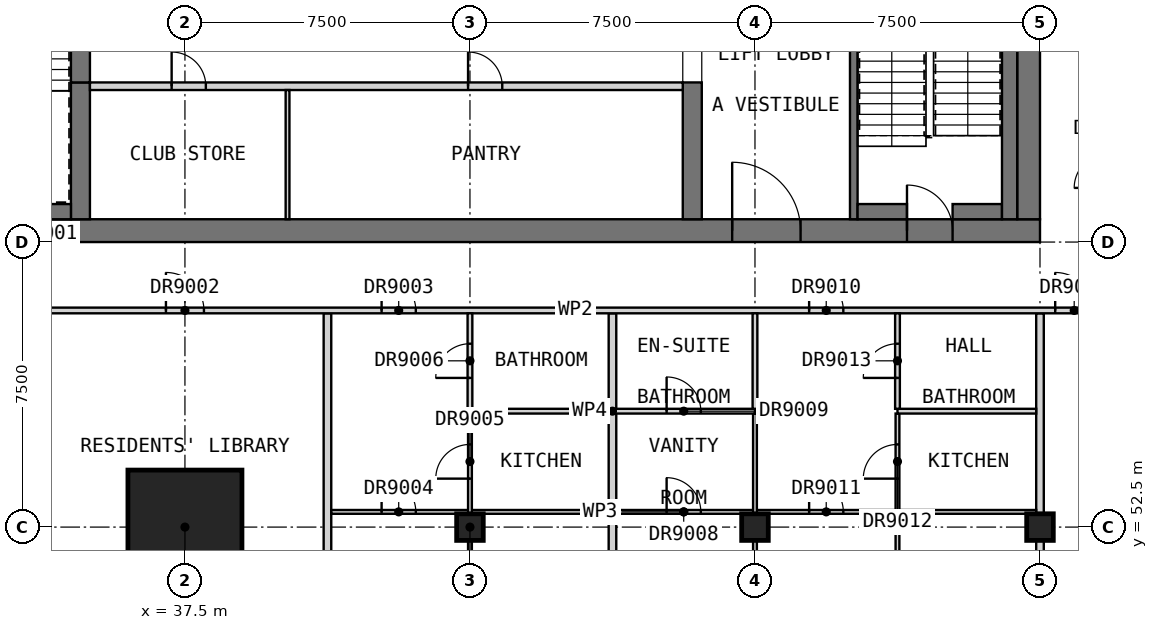
"""IFC4 building model, lengths in metres.
Left out: names, types, materials, properties, quantities, classifications, styles, units other than length and angle.
Written with IfcOpenShell. Run it as: python <this file> out.ifc"""

import sys

from ifc_helpers import new_model, si_unit, direction, frame, frame_2d, origin, origin_2d, place, context, subcontext, project, spatial, rectangle, extrude, element, fill, save


model = new_model("IFC4")
c1 = context("Model", 3, precision=1e-05, world=origin(), true_north=direction((0.0, 1.0)))
c2 = subcontext(c1, "Body", "Model", "MODEL_VIEW")
j1 = project(units=[si_unit("LENGTHUNIT", "METRE"), si_unit("PLANEANGLEUNIT", "RADIAN")], contexts=[c1])
p1 = place(None, origin())
s1 = spatial("IfcSite", under=j1, at=p1, CompositionType="ELEMENT")
p2 = place(p1, origin())
s2 = spatial("IfcBuilding", under=s1, at=p2, CompositionType="ELEMENT")
p3 = place(p2, frame((0.0, 0.0, 280.2)))
s3 = spatial("IfcBuildingStorey", under=s2, at=p3, CompositionType="ELEMENT", Elevation=280.2)
for number, where, z_axis, x_axis in (
    (1, (45.0, 52.5, 0.0), (0.0, 0.0, 1.0), (1.0, 0.0, 0.0)),
    (2, (52.5, 52.5, 0.0), (0.0, 0.0, 1.0), (1.0, 0.0, 0.0)),
    (3, (60.0, 52.5, 0.0), (0.0, 0.0, 1.0), (1.0, 0.0, 0.0)),
):
    element("IfcColumn", number, at=place(p3, frame(where, z_axis=z_axis, x_axis=x_axis)), inside=s3, PredefinedType="COLUMN", context=c2, shape_type="SweptSolid", body=[
        extrude(rectangle(XDim=0.7, YDim=0.7, at=origin_2d()), origin(), (0.0, 0.0, 1.0), 3.5),
    ])
p4 = place(p3, frame((37.5, 52.5, 0.0), z_axis=(0.0, 0.0, 1.0), x_axis=(1.0, 0.0, 0.0)))
e4 = element("IfcColumn", 4, at=p4, inside=s3, PredefinedType="COLUMN", context=c2, shape_type="SweptSolid", body=[
    extrude(rectangle(XDim=3.0, YDim=3.0, at=origin_2d()), origin(), (0.0, 0.0, 1.0), 3.5),
])
p5 = place(p3, frame((30.0, 60.3, 0.0), z_axis=(0.0, 0.0, 1.0), x_axis=(1.0, 0.0, 0.0)))
e5 = element("IfcWall", 5, at=p5, inside=s3, PredefinedType="SHEAR", context=c2, shape_type="SweptSolid", body=[
    extrude(rectangle(XDim=30.0, YDim=0.6, at=frame_2d((15.0, 0.0))), origin(), (0.0, 0.0, 1.0), 3.5),
])
p6 = place(p5, frame((21.9, 0.0, 0.0)))
e6 = element("IfcOpeningElement", 6, at=p6, cuts=e5, PredefinedType="OPENING", context=c2, shape_type="SweptSolid", body=[
    extrude(rectangle(XDim=1.8, YDim=2.1, at=frame_2d((0.9, 1.05))), frame((0.0, 0.31, 0.0), z_axis=(0.0, -1.0, 0.0), x_axis=(1.0, 0.0, 0.0)), (0.0, 0.0, 1.0), 0.62),
])
p7 = place(p5, frame((26.5, 0.0, 0.0)))
e7 = element("IfcOpeningElement", 7, at=p7, cuts=e5, PredefinedType="OPENING", context=c2, shape_type="SweptSolid", body=[
    extrude(rectangle(XDim=1.2, YDim=2.1, at=frame_2d((0.6, 1.05))), frame((0.0, 0.31, 0.0), z_axis=(0.0, -1.0, 0.0), x_axis=(1.0, 0.0, 0.0)), (0.0, 0.0, 1.0), 0.62),
])
p8 = place(p3, frame((59.7, 60.6, 0.0), z_axis=(0.0, 0.0, 1.0), x_axis=(0.0, 1.0, 0.0)))
e8 = element("IfcWall", 8, at=p8, inside=s3, PredefinedType="SHEAR", context=c2, shape_type="SweptSolid", body=[
    extrude(rectangle(XDim=21.3, YDim=0.6, at=frame_2d((10.65, 0.0))), origin(), (0.0, 0.0, 1.0), 3.5),
])
p9 = place(p8, frame((14.9, 0.0, 0.0)))
e9 = element("IfcOpeningElement", 9, at=p9, cuts=e8, PredefinedType="OPENING", context=c2, shape_type="SweptSolid", body=[
    extrude(rectangle(XDim=1.8, YDim=2.1, at=frame_2d((0.9, 1.05))), frame((0.0, 0.31, 0.0), z_axis=(0.0, -1.0, 0.0), x_axis=(1.0, 0.0, 0.0)), (0.0, 0.0, 1.0), 0.62),
])
for number, where, z_axis, x_axis in (
    (10, (34.75, 60.6, 0.0), (0.0, 0.0, 1.0), (0.0, 1.0, 0.0)),
    (11, (50.85, 60.6, 0.0), (0.0, 0.0, 1.0), (0.0, 1.0, 0.0)),
):
    element("IfcWall", number, at=place(p3, frame(where, z_axis=z_axis, x_axis=x_axis)), inside=s3, PredefinedType="SHEAR", context=c2, shape_type="SweptSolid", body=[
        extrude(rectangle(XDim=3.6, YDim=0.5, at=frame_2d((1.8, 0.0))), origin(), (0.0, 0.0, 1.0), 3.5),
    ])
p10 = place(p3, frame((35.0, 64.1, 0.0), z_axis=(0.0, 0.0, 1.0), x_axis=(1.0, 0.0, 0.0)))
e12 = element("IfcWall", 12, at=p10, inside=s3, PredefinedType="PARTITIONING", context=c2, shape_type="SweptSolid", body=[
    extrude(rectangle(XDim=15.6, YDim=0.2, at=frame_2d((7.8, 0.0))), origin(), (0.0, 0.0, 1.0), 3.25),
])
p11 = place(p10, frame((2.15, 0.0, 0.0)))
e13 = element("IfcOpeningElement", 13, at=p11, cuts=e12, PredefinedType="OPENING", context=c2, shape_type="SweptSolid", body=[
    extrude(rectangle(XDim=0.9, YDim=2.1, at=frame_2d((0.45, 1.05))), frame((0.0, 0.11, 0.0), z_axis=(0.0, -1.0, 0.0), x_axis=(1.0, 0.0, 0.0)), (0.0, 0.0, 1.0), 0.22),
])
p12 = place(p10, frame((9.95, 0.0, 0.0)))
e14 = element("IfcOpeningElement", 14, at=p12, cuts=e12, PredefinedType="OPENING", context=c2, shape_type="SweptSolid", body=[
    extrude(rectangle(XDim=0.9, YDim=2.1, at=frame_2d((0.45, 1.05))), frame((0.0, 0.11, 0.0), z_axis=(0.0, -1.0, 0.0), x_axis=(1.0, 0.0, 0.0)), (0.0, 0.0, 1.0), 0.22),
])
p13 = place(p3, frame((40.2, 60.6, 0.0), z_axis=(0.0, 0.0, 1.0), x_axis=(0.0, 1.0, 0.0)))
e15 = element("IfcWall", 15, at=p13, inside=s3, PredefinedType="PARTITIONING", context=c2, shape_type="SweptSolid", body=[
    extrude(rectangle(XDim=3.4, YDim=0.1, at=frame_2d((1.7, 0.0))), origin(), (0.0, 0.0, 1.0), 3.25),
])
p14 = place(p3, frame((34.75, 64.2, 0.0), z_axis=(0.0, 0.0, 1.0), x_axis=(0.0, 1.0, 0.0)))
e16 = element("IfcWall", 16, at=p14, inside=s3, PredefinedType="SOLIDWALL", context=c2, shape_type="SweptSolid", body=[
    extrude(rectangle(XDim=3.85, YDim=0.5, at=frame_2d((1.925, 0.0))), origin(), (0.0, 0.0, 1.0), 2.3),
])
p15 = place(p14, frame((2.3, 0.0, 0.0)))
e17 = element("IfcOpeningElement", 17, at=p15, cuts=e16, PredefinedType="OPENING", context=c2, shape_type="SweptSolid", body=[
    extrude(rectangle(XDim=1.2, YDim=2.1, at=frame_2d((0.6, 1.05))), frame((0.0, 0.26, 0.0), z_axis=(0.0, -1.0, 0.0), x_axis=(1.0, 0.0, 0.0)), (0.0, 0.0, 1.0), 0.52),
])
p16 = place(p3, frame((55.1, 60.6, 0.0), z_axis=(0.0, 0.0, 1.0), x_axis=(0.0, 1.0, 0.0)))
e18 = element("IfcWall", 18, at=p16, inside=s3, PredefinedType="SOLIDWALL", context=c2, shape_type="SweptSolid", body=[
    extrude(rectangle(XDim=8.0, YDim=0.2, at=frame_2d((4.0, 0.0))), origin(), (0.0, 0.0, 1.0), 3.25),
])
p17 = place(p3, frame((31.0, 60.8, 0.0), z_axis=(0.0, 0.0, 1.0), x_axis=(1.0, 0.0, 0.0)))
e19 = element("IfcWall", 19, at=p17, inside=s3, PredefinedType="SOLIDWALL", context=c2, shape_type="SweptSolid", body=[
    extrude(rectangle(XDim=3.5, YDim=0.4, at=frame_2d((1.75, 0.0))), origin(), (0.0, 0.0, 1.0), 3.25),
])
for number, where, z_axis, x_axis in (
    (20, (55.2, 60.8, 0.0), (0.0, 0.0, 1.0), (1.0, 0.0, 0.0)),
    (21, (57.7, 60.8, 0.0), (0.0, 0.0, 1.0), (1.0, 0.0, 0.0)),
):
    element("IfcWall", number, at=place(p3, frame(where, z_axis=z_axis, x_axis=x_axis)), inside=s3, PredefinedType="SOLIDWALL", context=c2, shape_type="SweptSolid", body=[
        extrude(rectangle(XDim=1.3, YDim=0.4, at=frame_2d((0.65, 0.0))), origin(), (0.0, 0.0, 1.0), 3.25),
    ])
p18 = place(p3, frame((59.2, 60.6, 0.0), z_axis=(0.0, 0.0, 1.0), x_axis=(0.0, 1.0, 0.0)))
e22 = element("IfcWall", 22, at=p18, inside=s3, PredefinedType="SOLIDWALL", context=c2, shape_type="SweptSolid", body=[
    extrude(rectangle(XDim=7.9, YDim=0.4, at=frame_2d((3.95, 0.0))), origin(), (0.0, 0.0, 1.0), 3.25),
])
for number, where, z_axis, x_axis in (
    (23, (41.25, 45.81, 0.0), (0.0, 0.0, 1.0), (0.0, 1.0, 0.0)),
    (24, (48.75, 45.81, 0.0), (0.0, 0.0, 1.0), (0.0, 1.0, 0.0)),
):
    element("IfcWall", number, at=place(p3, frame(where, z_axis=z_axis, x_axis=x_axis)), inside=s3, PredefinedType="PARTITIONING", context=c2, shape_type="SweptSolid", body=[
        extrude(rectangle(XDim=12.315, YDim=0.2, at=frame_2d((6.157, 0.0))), origin(), (0.0, 0.0, 1.0), 3.25),
    ])
p19 = place(p3, frame((60.0, 45.0, 0.0), z_axis=(0.0, 0.0, 1.0), x_axis=(0.0, 1.0, 0.0)))
e25 = element("IfcWall", 25, at=p19, inside=s3, PredefinedType="PARTITIONING", context=c2, shape_type="SweptSolid", body=[
    extrude(rectangle(XDim=13.125, YDim=0.2, at=frame_2d((6.562, 0.0))), origin(), (0.0, 0.0, 1.0), 3.25),
])
p20 = place(p3, frame((33.75, 58.2, 0.0), z_axis=(0.0, 0.0, 1.0), x_axis=(1.0, 0.0, 0.0)))
e26 = element("IfcWall", 26, at=p20, inside=s3, PredefinedType="PARTITIONING", context=c2, shape_type="SweptSolid", body=[
    extrude(rectangle(XDim=28.05, YDim=0.15, at=frame_2d((14.025, 0.0))), origin(), (0.0, 0.0, 1.0), 3.25),
])
p21 = place(p20, frame((3.25, 0.0, 0.0)))
e27 = element("IfcOpeningElement", 27, at=p21, cuts=e26, PredefinedType="OPENING", context=c2, shape_type="SweptSolid", body=[
    extrude(rectangle(XDim=1.0, YDim=2.1, at=frame_2d((0.5, 1.05))), frame((0.0, 0.085, 0.0), z_axis=(0.0, -1.0, 0.0), x_axis=(1.0, 0.0, 0.0)), (0.0, 0.0, 1.0), 0.17),
])
p22 = place(p20, frame((8.925, 0.0, 0.0)))
e28 = element("IfcOpeningElement", 28, at=p22, cuts=e26, PredefinedType="OPENING", context=c2, shape_type="SweptSolid", body=[
    extrude(rectangle(XDim=0.9, YDim=2.1, at=frame_2d((0.45, 1.05))), frame((0.0, 0.085, 0.0), z_axis=(0.0, -1.0, 0.0), x_axis=(1.0, 0.0, 0.0)), (0.0, 0.0, 1.0), 0.17),
])
p23 = place(p20, frame((20.175, 0.0, 0.0)))
e29 = element("IfcOpeningElement", 29, at=p23, cuts=e26, PredefinedType="OPENING", context=c2, shape_type="SweptSolid", body=[
    extrude(rectangle(XDim=0.9, YDim=2.1, at=frame_2d((0.45, 1.05))), frame((0.0, 0.085, 0.0), z_axis=(0.0, -1.0, 0.0), x_axis=(1.0, 0.0, 0.0)), (0.0, 0.0, 1.0), 0.17),
])
p24 = place(p20, frame((26.65, 0.0, 0.0)))
e30 = element("IfcOpeningElement", 30, at=p24, cuts=e26, PredefinedType="OPENING", context=c2, shape_type="SweptSolid", body=[
    extrude(rectangle(XDim=1.0, YDim=2.1, at=frame_2d((0.5, 1.05))), frame((0.0, 0.085, 0.0), z_axis=(0.0, -1.0, 0.0), x_axis=(1.0, 0.0, 0.0)), (0.0, 0.0, 1.0), 0.17),
])
p25 = place(p3, frame((41.35, 52.9, 0.0), z_axis=(0.0, 0.0, 1.0), x_axis=(1.0, 0.0, 0.0)))
e31 = element("IfcWall", 31, at=p25, inside=s3, PredefinedType="PARTITIONING", context=c2, shape_type="SweptSolid", body=[
    extrude(rectangle(XDim=18.55, YDim=0.1, at=frame_2d((9.275, 0.0))), origin(), (0.0, 0.0, 1.0), 3.25),
])
p26 = place(p25, frame((1.325, 0.0, 0.0)))
e32 = element("IfcOpeningElement", 32, at=p26, cuts=e31, PredefinedType="OPENING", context=c2, shape_type="SweptSolid", body=[
    extrude(rectangle(XDim=0.9, YDim=2.1, at=frame_2d((0.45, 1.05))), frame((0.0, 0.06, 0.0), z_axis=(0.0, -1.0, 0.0), x_axis=(1.0, 0.0, 0.0)), (0.0, 0.0, 1.0), 0.12),
])
p27 = place(p25, frame((8.825, 0.0, 0.0)))
e33 = element("IfcOpeningElement", 33, at=p27, cuts=e31, PredefinedType="OPENING", context=c2, shape_type="SweptSolid", body=[
    extrude(rectangle(XDim=0.9, YDim=2.1, at=frame_2d((0.45, 1.05))), frame((0.0, 0.06, 0.0), z_axis=(0.0, -1.0, 0.0), x_axis=(1.0, 0.0, 0.0)), (0.0, 0.0, 1.0), 0.12),
])
p28 = place(p25, frame((12.575, 0.0, 0.0)))
e34 = element("IfcOpeningElement", 34, at=p28, cuts=e31, PredefinedType="OPENING", context=c2, shape_type="SweptSolid", body=[
    extrude(rectangle(XDim=0.9, YDim=2.1, at=frame_2d((0.45, 1.05))), frame((0.0, 0.06, 0.0), z_axis=(0.0, -1.0, 0.0), x_axis=(1.0, 0.0, 0.0)), (0.0, 0.0, 1.0), 0.12),
])
p29 = place(p3, frame((45.0, 45.0, 0.0), z_axis=(0.0, 0.0, 1.0), x_axis=(0.0, 1.0, 0.0)))
e35 = element("IfcWall", 35, at=p29, inside=s3, PredefinedType="PARTITIONING", context=c2, shape_type="SweptSolid", body=[
    extrude(rectangle(XDim=10.488, YDim=0.1, at=frame_2d((5.244, 0.0))), origin(), (0.0, 0.0, 1.0), 3.25),
])
p30 = place(p29, frame((8.775, 0.0, 0.0)))
e36 = element("IfcOpeningElement", 36, at=p30, cuts=e35, PredefinedType="OPENING", context=c2, shape_type="SweptSolid", body=[
    extrude(rectangle(XDim=0.9, YDim=2.1, at=frame_2d((0.45, 1.05))), frame((0.0, 0.06, 0.0), z_axis=(0.0, -1.0, 0.0), x_axis=(1.0, 0.0, 0.0)), (0.0, 0.0, 1.0), 0.12),
])
p31 = place(p29, frame((3.5, 0.0, 0.0)))
e37 = element("IfcOpeningElement", 37, at=p31, cuts=e35, PredefinedType="OPENING", context=c2, shape_type="SweptSolid", body=[
    extrude(rectangle(XDim=0.9, YDim=2.1, at=frame_2d((0.45, 1.05))), frame((0.0, 0.06, 0.0), z_axis=(0.0, -1.0, 0.0), x_axis=(1.0, 0.0, 0.0)), (0.0, 0.0, 1.0), 0.12),
])
p32 = place(p3, frame((52.5, 45.0, 0.0), z_axis=(0.0, 0.0, 1.0), x_axis=(0.0, 1.0, 0.0)))
e38 = element("IfcWall", 38, at=p32, inside=s3, PredefinedType="PARTITIONING", context=c2, shape_type="SweptSolid", body=[
    extrude(rectangle(XDim=10.488, YDim=0.1, at=frame_2d((5.244, 0.0))), origin(), (0.0, 0.0, 1.0), 3.25),
])
p33 = place(p32, frame((3.5, 0.0, 0.0)))
e39 = element("IfcOpeningElement", 39, at=p33, cuts=e38, PredefinedType="OPENING", context=c2, shape_type="SweptSolid", body=[
    extrude(rectangle(XDim=0.9, YDim=2.1, at=frame_2d((0.45, 1.05))), frame((0.0, 0.06, 0.0), z_axis=(0.0, -1.0, 0.0), x_axis=(1.0, 0.0, 0.0)), (0.0, 0.0, 1.0), 0.12),
])
p34 = place(p3, frame((56.25, 45.81, 0.0), z_axis=(0.0, 0.0, 1.0), x_axis=(0.0, 1.0, 0.0)))
e40 = element("IfcWall", 40, at=p34, inside=s3, PredefinedType="PARTITIONING", context=c2, shape_type="SweptSolid", body=[
    extrude(rectangle(XDim=9.677, YDim=0.1, at=frame_2d((4.839, 0.0))), origin(), (0.0, 0.0, 1.0), 3.25),
])
p35 = place(p34, frame((7.965, 0.0, 0.0)))
e41 = element("IfcOpeningElement", 41, at=p35, cuts=e40, PredefinedType="OPENING", context=c2, shape_type="SweptSolid", body=[
    extrude(rectangle(XDim=0.9, YDim=2.1, at=frame_2d((0.45, 1.05))), frame((0.0, 0.06, 0.0), z_axis=(0.0, -1.0, 0.0), x_axis=(1.0, 0.0, 0.0)), (0.0, 0.0, 1.0), 0.12),
])
p36 = place(p34, frame((2.69, 0.0, 0.0)))
e42 = element("IfcOpeningElement", 42, at=p36, cuts=e40, PredefinedType="OPENING", context=c2, shape_type="SweptSolid", body=[
    extrude(rectangle(XDim=0.9, YDim=2.1, at=frame_2d((0.45, 1.05))), frame((0.0, 0.06, 0.0), z_axis=(0.0, -1.0, 0.0), x_axis=(1.0, 0.0, 0.0)), (0.0, 0.0, 1.0), 0.12),
])
p37 = place(p3, frame((45.0, 55.55, 0.0), z_axis=(0.0, 0.0, 1.0), x_axis=(1.0, 0.0, 0.0)))
e43 = element("IfcWall", 43, at=p37, inside=s3, PredefinedType="PARTITIONING", context=c2, shape_type="SweptSolid", body=[
    extrude(rectangle(XDim=7.5, YDim=0.125, at=frame_2d((3.75, 0.0))), origin(), (0.0, 0.0, 1.0), 3.25),
])
p38 = place(p37, frame((5.175, 0.0, 0.0)))
e44 = element("IfcOpeningElement", 44, at=p38, cuts=e43, PredefinedType="OPENING", context=c2, shape_type="SweptSolid", body=[
    extrude(rectangle(XDim=0.9, YDim=2.1, at=frame_2d((0.45, 1.05))), frame((0.0, 0.073, 0.0), z_axis=(0.0, -1.0, 0.0), x_axis=(1.0, 0.0, 0.0)), (0.0, 0.0, 1.0), 0.145),
])
p39 = place(p3, frame((56.25, 55.55, 0.0), z_axis=(0.0, 0.0, 1.0), x_axis=(1.0, 0.0, 0.0)))
e45 = element("IfcWall", 45, at=p39, inside=s3, PredefinedType="PARTITIONING", context=c2, shape_type="SweptSolid", body=[
    extrude(rectangle(XDim=3.65, YDim=0.125, at=frame_2d((1.825, 0.0))), origin(), (0.0, 0.0, 1.0), 3.25),
])
p40 = place(p3, frame((45.0, 55.613, 0.0), z_axis=(0.0, 0.0, 1.0), x_axis=(0.0, 1.0, 0.0)))
e46 = element("IfcWall", 46, at=p40, inside=s3, PredefinedType="PARTITIONING", context=c2, shape_type="SweptSolid", body=[
    extrude(rectangle(XDim=2.512, YDim=0.125, at=frame_2d((1.256, 0.0))), origin(), (0.0, 0.0, 1.0), 3.25),
])
p41 = place(p40, frame((0.812, 0.0, 0.0)))
e47 = element("IfcOpeningElement", 47, at=p41, cuts=e46, PredefinedType="OPENING", context=c2, shape_type="SweptSolid", body=[
    extrude(rectangle(XDim=0.9, YDim=2.1, at=frame_2d((0.45, 1.05))), frame((0.0, 0.073, 0.0), z_axis=(0.0, -1.0, 0.0), x_axis=(1.0, 0.0, 0.0)), (0.0, 0.0, 1.0), 0.145),
])
p42 = place(p3, frame((52.5, 55.613, 0.0), z_axis=(0.0, 0.0, 1.0), x_axis=(0.0, 1.0, 0.0)))
e48 = element("IfcWall", 48, at=p42, inside=s3, PredefinedType="PARTITIONING", context=c2, shape_type="SweptSolid", body=[
    extrude(rectangle(XDim=2.512, YDim=0.125, at=frame_2d((1.256, 0.0))), origin(), (0.0, 0.0, 1.0), 3.25),
])
p43 = place(p3, frame((56.25, 55.613, 0.0), z_axis=(0.0, 0.0, 1.0), x_axis=(0.0, 1.0, 0.0)))
e49 = element("IfcWall", 49, at=p43, inside=s3, PredefinedType="PARTITIONING", context=c2, shape_type="SweptSolid", body=[
    extrude(rectangle(XDim=2.512, YDim=0.125, at=frame_2d((1.256, 0.0))), origin(), (0.0, 0.0, 1.0), 3.25),
])
p44 = place(p43, frame((0.812, 0.0, 0.0)))
e50 = element("IfcOpeningElement", 50, at=p44, cuts=e49, PredefinedType="OPENING", context=c2, shape_type="SweptSolid", body=[
    extrude(rectangle(XDim=0.9, YDim=2.1, at=frame_2d((0.45, 1.05))), frame((0.0, 0.073, 0.0), z_axis=(0.0, -1.0, 0.0), x_axis=(1.0, 0.0, 0.0)), (0.0, 0.0, 1.0), 0.145),
])
p45 = place(p11, origin())
e51 = element("IfcDoor", 51, at=p45, inside=s3, OperationType="SINGLE_SWING_RIGHT", PredefinedType="DOOR", context=c2, shape_type="SweptSolid", body=[
    extrude(rectangle(XDim=0.9, YDim=2.1, at=frame_2d((0.45, 1.05))), frame((0.0, 0.025, 0.0), z_axis=(0.0, -1.0, 0.0), x_axis=(1.0, 0.0, 0.0)), (0.0, 0.0, 1.0), 0.05),
])
fill(e13, e51)
p46 = place(p12, origin())
e52 = element("IfcDoor", 52, at=p46, inside=s3, OperationType="SINGLE_SWING_LEFT", PredefinedType="DOOR", context=c2, shape_type="SweptSolid", body=[
    extrude(rectangle(XDim=0.9, YDim=2.1, at=frame_2d((0.45, 1.05))), frame((0.0, 0.025, 0.0), z_axis=(0.0, -1.0, 0.0), x_axis=(1.0, 0.0, 0.0)), (0.0, 0.0, 1.0), 0.05),
])
fill(e14, e52)
p47 = place(p6, origin())
e53 = element("IfcDoor", 53, at=p47, inside=s3, OperationType="DOUBLE_DOOR_SINGLE_SWING", PredefinedType="DOOR", context=c2, shape_type="SweptSolid", body=[
    extrude(rectangle(XDim=1.8, YDim=2.1, at=frame_2d((0.9, 1.05))), frame((0.0, 0.025, 0.0), z_axis=(0.0, -1.0, 0.0), x_axis=(1.0, 0.0, 0.0)), (0.0, 0.0, 1.0), 0.05),
])
fill(e6, e53)
p48 = place(p7, origin())
e54 = element("IfcDoor", 54, at=p48, inside=s3, OperationType="SINGLE_SWING_LEFT", PredefinedType="DOOR", context=c2, shape_type="SweptSolid", body=[
    extrude(rectangle(XDim=1.2, YDim=2.1, at=frame_2d((0.6, 1.05))), frame((0.0, 0.025, 0.0), z_axis=(0.0, -1.0, 0.0), x_axis=(1.0, 0.0, 0.0)), (0.0, 0.0, 1.0), 0.05),
])
fill(e7, e54)
p49 = place(p21, origin())
e55 = element("IfcDoor", 55, at=p49, inside=s3, OperationType="SINGLE_SWING_RIGHT", PredefinedType="DOOR", context=c2, shape_type="SweptSolid", body=[
    extrude(rectangle(XDim=1.0, YDim=2.1, at=frame_2d((0.5, 1.05))), frame((0.0, 0.025, 0.0), z_axis=(0.0, -1.0, 0.0), x_axis=(1.0, 0.0, 0.0)), (0.0, 0.0, 1.0), 0.05),
])
fill(e27, e55)
p50 = place(p22, origin())
e56 = element("IfcDoor", 56, at=p50, inside=s3, OperationType="SINGLE_SWING_RIGHT", PredefinedType="DOOR", context=c2, shape_type="SweptSolid", body=[
    extrude(rectangle(XDim=0.9, YDim=2.1, at=frame_2d((0.45, 1.05))), frame((0.0, 0.025, 0.0), z_axis=(0.0, -1.0, 0.0), x_axis=(1.0, 0.0, 0.0)), (0.0, 0.0, 1.0), 0.05),
])
fill(e28, e56)
p51 = place(p26, origin())
e57 = element("IfcDoor", 57, at=p51, inside=s3, OperationType="SINGLE_SWING_LEFT", PredefinedType="DOOR", context=c2, shape_type="SweptSolid", body=[
    extrude(rectangle(XDim=0.9, YDim=2.1, at=frame_2d((0.45, 1.05))), frame((0.0, 0.025, 0.0), z_axis=(0.0, -1.0, 0.0), x_axis=(1.0, 0.0, 0.0)), (0.0, 0.0, 1.0), 0.05),
])
fill(e32, e57)
p52 = place(p30, origin())
e58 = element("IfcDoor", 58, at=p52, inside=s3, OperationType="SINGLE_SWING_LEFT", PredefinedType="DOOR", context=c2, shape_type="SweptSolid", body=[
    extrude(rectangle(XDim=0.9, YDim=2.1, at=frame_2d((0.45, 1.05))), frame((0.0, 0.025, 0.0), z_axis=(0.0, -1.0, 0.0), x_axis=(1.0, 0.0, 0.0)), (0.0, 0.0, 1.0), 0.05),
])
fill(e36, e58)
p53 = place(p41, origin())
e59 = element("IfcDoor", 59, at=p53, inside=s3, OperationType="SINGLE_SWING_RIGHT", PredefinedType="DOOR", context=c2, shape_type="SweptSolid", body=[
    extrude(rectangle(XDim=0.9, YDim=2.1, at=frame_2d((0.45, 1.05))), frame((0.0, 0.025, 0.0), z_axis=(0.0, -1.0, 0.0), x_axis=(1.0, 0.0, 0.0)), (0.0, 0.0, 1.0), 0.05),
])
fill(e47, e59)
p54 = place(p27, origin())
e60 = element("IfcDoor", 60, at=p54, inside=s3, OperationType="SINGLE_SWING_LEFT", PredefinedType="DOOR", context=c2, shape_type="SweptSolid", body=[
    extrude(rectangle(XDim=0.9, YDim=2.1, at=frame_2d((0.45, 1.05))), frame((0.0, 0.025, 0.0), z_axis=(0.0, -1.0, 0.0), x_axis=(1.0, 0.0, 0.0)), (0.0, 0.0, 1.0), 0.05),
])
fill(e33, e60)
p55 = place(p38, origin())
e61 = element("IfcDoor", 61, at=p55, inside=s3, OperationType="SINGLE_SWING_LEFT", PredefinedType="DOOR", context=c2, shape_type="SweptSolid", body=[
    extrude(rectangle(XDim=0.9, YDim=2.1, at=frame_2d((0.45, 1.05))), frame((0.0, 0.025, 0.0), z_axis=(0.0, -1.0, 0.0), x_axis=(1.0, 0.0, 0.0)), (0.0, 0.0, 1.0), 0.05),
])
fill(e44, e61)
p56 = place(p23, origin())
e62 = element("IfcDoor", 62, at=p56, inside=s3, OperationType="SINGLE_SWING_RIGHT", PredefinedType="DOOR", context=c2, shape_type="SweptSolid", body=[
    extrude(rectangle(XDim=0.9, YDim=2.1, at=frame_2d((0.45, 1.05))), frame((0.0, 0.025, 0.0), z_axis=(0.0, -1.0, 0.0), x_axis=(1.0, 0.0, 0.0)), (0.0, 0.0, 1.0), 0.05),
])
fill(e29, e62)
p57 = place(p28, origin())
e63 = element("IfcDoor", 63, at=p57, inside=s3, OperationType="SINGLE_SWING_LEFT", PredefinedType="DOOR", context=c2, shape_type="SweptSolid", body=[
    extrude(rectangle(XDim=0.9, YDim=2.1, at=frame_2d((0.45, 1.05))), frame((0.0, 0.025, 0.0), z_axis=(0.0, -1.0, 0.0), x_axis=(1.0, 0.0, 0.0)), (0.0, 0.0, 1.0), 0.05),
])
fill(e34, e63)
p58 = place(p35, origin())
e64 = element("IfcDoor", 64, at=p58, inside=s3, OperationType="SINGLE_SWING_LEFT", PredefinedType="DOOR", context=c2, shape_type="SweptSolid", body=[
    extrude(rectangle(XDim=0.9, YDim=2.1, at=frame_2d((0.45, 1.05))), frame((0.0, 0.025, 0.0), z_axis=(0.0, -1.0, 0.0), x_axis=(1.0, 0.0, 0.0)), (0.0, 0.0, 1.0), 0.05),
])
fill(e41, e64)
p59 = place(p44, origin())
e65 = element("IfcDoor", 65, at=p59, inside=s3, OperationType="SINGLE_SWING_RIGHT", PredefinedType="DOOR", context=c2, shape_type="SweptSolid", body=[
    extrude(rectangle(XDim=0.9, YDim=2.1, at=frame_2d((0.45, 1.05))), frame((0.0, 0.025, 0.0), z_axis=(0.0, -1.0, 0.0), x_axis=(1.0, 0.0, 0.0)), (0.0, 0.0, 1.0), 0.05),
])
fill(e50, e65)
p60 = place(p24, origin())
e66 = element("IfcDoor", 66, at=p60, inside=s3, OperationType="SINGLE_SWING_RIGHT", PredefinedType="DOOR", context=c2, shape_type="SweptSolid", body=[
    extrude(rectangle(XDim=1.0, YDim=2.1, at=frame_2d((0.5, 1.05))), frame((0.0, 0.025, 0.0), z_axis=(0.0, -1.0, 0.0), x_axis=(1.0, 0.0, 0.0)), (0.0, 0.0, 1.0), 0.05),
])
fill(e30, e66)
save(model, sys.argv[1])
